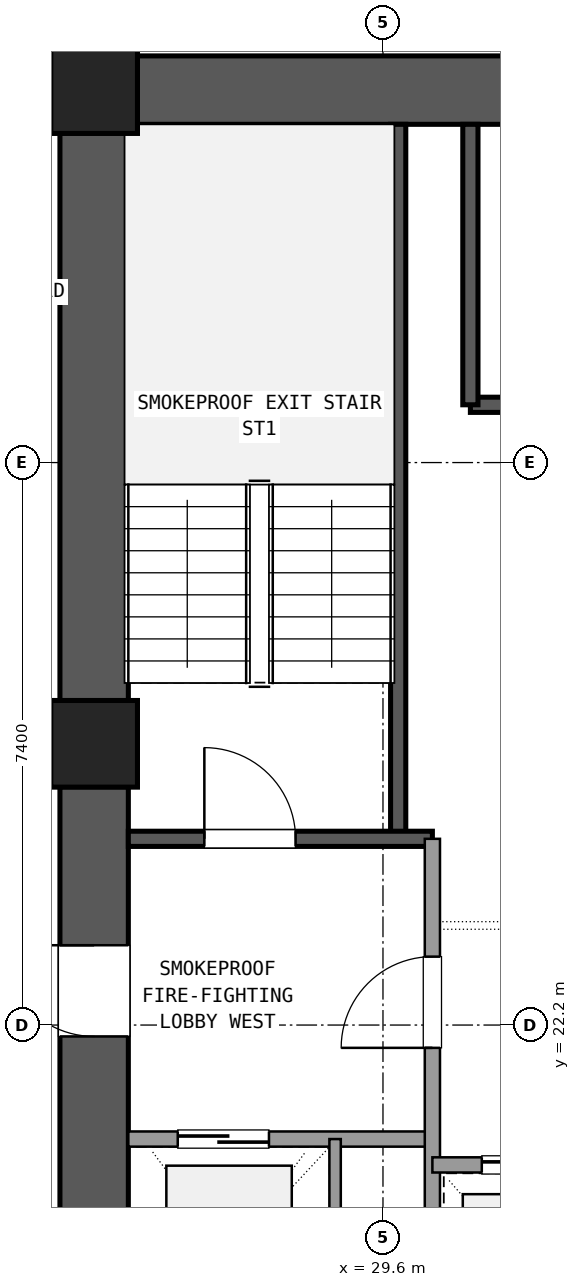
"""IFC4 building model, lengths in metres.
Left out: names, types, materials, properties, quantities, classifications, styles, units other than length and angle.
Written with IfcOpenShell. Run it as: python <this file> out.ifc"""

import sys

from ifc_helpers import new_model, si_unit, direction, frame, frame_2d, origin, origin_2d, place, context, subcontext, project, spatial, rectangle, extrude, element, fill, save


model = new_model("IFC4")
c1 = context("Model", 3, precision=1e-05, world=origin(), true_north=direction((0.0, 1.0)))
c2 = subcontext(c1, "Body", "Model", "MODEL_VIEW")
j1 = project(units=[si_unit("LENGTHUNIT", "METRE"), si_unit("PLANEANGLEUNIT", "RADIAN")], contexts=[c1])
p1 = place(None, origin())
s1 = spatial("IfcSite", under=j1, at=p1, CompositionType="ELEMENT")
p2 = place(p1, origin())
s2 = spatial("IfcBuilding", under=s1, at=p2, CompositionType="ELEMENT")
p3 = place(p2, frame((0.0, 0.0, 45.54)))
s3 = spatial("IfcBuildingStorey", under=s2, at=p3, CompositionType="ELEMENT", Elevation=45.54)
for number, where, z_axis, x_axis in (
    (1, (25.8, 34.5, 0.0), (0.0, 0.0, 1.0), (1.0, 0.0, 0.0)),
    (2, (25.8, 25.9, 0.0), (0.0, 0.0, 1.0), (1.0, 0.0, 0.0)),
):
    element("IfcColumn", number, at=place(p3, frame(where, z_axis=z_axis, x_axis=x_axis)), inside=s3, PredefinedType="COLUMN", context=c2, shape_type="SweptSolid", body=[
        extrude(rectangle(XDim=1.14, YDim=1.14, at=origin_2d()), origin(), (0.0, 0.0, 1.0), 3.6),
    ])
p4 = place(p3, frame((36.435, 34.5, 0.0), z_axis=(0.0, 0.0, 1.0), x_axis=(-1.0, 0.0, 0.0)))
e3 = element("IfcWall", 3, at=p4, inside=s3, PredefinedType="SHEAR", context=c2, shape_type="SweptSolid", body=[
    extrude(rectangle(XDim=10.07, YDim=0.9, at=frame_2d((5.035, 0.0))), origin(), (0.0, 0.0, 1.0), 3.32),
])
p5 = place(p4, frame((4.035, 0.0, 0.0)))
e4 = element("IfcOpeningElement", 4, at=p5, cuts=e3, PredefinedType="OPENING", context=c2, shape_type="SweptSolid", body=[
    extrude(rectangle(XDim=1.2, YDim=2.15, at=frame_2d((0.6, 1.075))), frame((0.0, 0.46, 0.0), z_axis=(0.0, -1.0, 0.0), x_axis=(1.0, 0.0, 0.0)), (0.0, 0.0, 1.0), 0.92),
])
p6 = place(p3, frame((25.8, 33.935, 0.0), z_axis=(0.0, 0.0, 1.0), x_axis=(0.0, -1.0, 0.0)))
e5 = element("IfcWall", 5, at=p6, inside=s3, PredefinedType="SHEAR", context=c2, shape_type="SweptSolid", body=[
    extrude(rectangle(XDim=7.47, YDim=0.9, at=frame_2d((3.735, 0.0))), origin(), (0.0, 0.0, 1.0), 3.32),
])
p7 = place(p3, frame((25.8, 25.335, 0.0), z_axis=(0.0, 0.0, 1.0), x_axis=(0.0, -1.0, 0.0)))
e6 = element("IfcWall", 6, at=p7, inside=s3, PredefinedType="SHEAR", context=c2, shape_type="SweptSolid", body=[
    extrude(rectangle(XDim=7.47, YDim=0.9, at=frame_2d((3.735, 0.0))), origin(), (0.0, 0.0, 1.0), 3.32),
])
p8 = place(p7, frame((2.085, 0.0, 0.0)))
e7 = element("IfcOpeningElement", 7, at=p8, cuts=e6, PredefinedType="OPENING", context=c2, shape_type="SweptSolid", body=[
    extrude(rectangle(XDim=1.2, YDim=2.15, at=frame_2d((0.6, 1.075))), frame((0.0, 0.46, 0.0), z_axis=(0.0, -1.0, 0.0), x_axis=(1.0, 0.0, 0.0)), (0.0, 0.0, 1.0), 0.92),
])
p9 = place(p3, frame((29.8, 24.65, 0.0), z_axis=(0.0, 0.0, 1.0), x_axis=(0.0, 1.0, 0.0)))
e8 = element("IfcWall", 8, at=p9, inside=s3, PredefinedType="SHEAR", context=c2, shape_type="SweptSolid", body=[
    extrude(rectangle(XDim=9.4, YDim=0.2, at=frame_2d((4.7, 0.0))), origin(), (0.0, 0.0, 1.0), 3.32),
])
p10 = place(p3, frame((26.25, 24.65, 0.0), z_axis=(0.0, 0.0, 1.0), x_axis=(1.0, 0.0, 0.0)))
e9 = element("IfcWall", 9, at=p10, inside=s3, PredefinedType="SHEAR", context=c2, shape_type="SweptSolid", body=[
    extrude(rectangle(XDim=4.0, YDim=0.2, at=frame_2d((2.0, 0.0))), origin(), (0.0, 0.0, 1.0), 3.32),
])
p11 = place(p10, frame((1.0, 0.0, 0.0)))
e10 = element("IfcOpeningElement", 10, at=p11, cuts=e9, PredefinedType="OPENING", context=c2, shape_type="SweptSolid", body=[
    extrude(rectangle(XDim=1.2, YDim=2.15, at=frame_2d((0.6, 1.075))), frame((0.0, 0.11, 0.0), z_axis=(0.0, -1.0, 0.0), x_axis=(1.0, 0.0, 0.0)), (0.0, 0.0, 1.0), 0.22),
])
p12 = place(p3, frame((30.75, 30.36, 0.0), z_axis=(0.0, 0.0, 1.0), x_axis=(1.0, 0.0, 0.0)))
e11 = element("IfcWall", 11, at=p12, inside=s3, PredefinedType="SHEAR", context=c2, shape_type="SweptSolid", body=[
    extrude(rectangle(XDim=9.5, YDim=0.2, at=frame_2d((4.75, 0.0))), origin(), (0.0, 0.0, 1.0), 3.32),
])
p13 = place(p3, frame((30.75, 30.36, 0.0), z_axis=(0.0, 0.0, 1.0), x_axis=(0.0, 1.0, 0.0)))
e12 = element("IfcWall", 12, at=p13, inside=s3, PredefinedType="SHEAR", context=c2, shape_type="SweptSolid", body=[
    extrude(rectangle(XDim=3.69, YDim=0.2, at=frame_2d((1.845, 0.0))), origin(), (0.0, 0.0, 1.0), 3.32),
])
p14 = place(p3, frame((26.25, 20.7, 0.0), z_axis=(0.0, 0.0, 1.0), x_axis=(1.0, 0.0, 0.0)))
e13 = element("IfcWall", 13, at=p14, inside=s3, PredefinedType="SOLIDWALL", context=c2, shape_type="SweptSolid", body=[
    extrude(rectangle(XDim=4.0, YDim=0.2, at=frame_2d((2.0, 0.0))), origin(), (0.0, 0.0, 1.0), 2.61),
])
p15 = place(p14, frame((0.65, 0.0, 0.0)))
e14 = element("IfcOpeningElement", 14, at=p15, cuts=e13, PredefinedType="OPENING", context=c2, shape_type="SweptSolid", body=[
    extrude(rectangle(XDim=1.2, YDim=2.15, at=frame_2d((0.6, 1.075))), frame((0.0, 0.11, 0.0), z_axis=(0.0, -1.0, 0.0), x_axis=(1.0, 0.0, 0.0)), (0.0, 0.0, 1.0), 0.22),
])
p16 = place(p3, frame((30.25, 17.75, 0.0), z_axis=(0.0, 0.0, 1.0), x_axis=(0.0, 1.0, 0.0)))
e15 = element("IfcWall", 15, at=p16, inside=s3, PredefinedType="SOLIDWALL", context=c2, shape_type="SweptSolid", body=[
    extrude(rectangle(XDim=6.9, YDim=0.2, at=frame_2d((3.45, 0.0))), origin(), (0.0, 0.0, 1.0), 2.61),
])
p17 = place(p16, frame((4.15, 0.0, 0.0)))
e16 = element("IfcOpeningElement", 16, at=p17, cuts=e15, PredefinedType="OPENING", context=c2, shape_type="SweptSolid", body=[
    extrude(rectangle(XDim=1.2, YDim=2.15, at=frame_2d((0.6, 1.075))), frame((0.0, 0.11, 0.0), z_axis=(0.0, -1.0, 0.0), x_axis=(1.0, 0.0, 0.0)), (0.0, 0.0, 1.0), 0.22),
])
p18 = place(p3, frame((28.97, 17.75, 0.0), z_axis=(0.0, 0.0, 1.0), x_axis=(0.0, 1.0, 0.0)))
e17 = element("IfcWall", 17, at=p18, inside=s3, PredefinedType="PARTITIONING", context=c2, shape_type="SweptSolid", body=[
    extrude(rectangle(XDim=2.95, YDim=0.15, at=frame_2d((1.475, 0.0))), origin(), (0.0, 0.0, 1.0), 2.61),
])
p19 = place(p3, frame((30.25, 20.36, 0.0), z_axis=(0.0, 0.0, 1.0), x_axis=(1.0, 0.0, 0.0)))
e18 = element("IfcWall", 18, at=p19, inside=s3, PredefinedType="SOLIDWALL", context=c2, shape_type="SweptSolid", body=[
    extrude(rectangle(XDim=7.0, YDim=0.2, at=frame_2d((3.5, 0.0))), origin(), (0.0, 0.0, 1.0), 2.61),
])
p20 = place(p19, frame((0.65, 0.0, 0.0)))
e19 = element("IfcOpeningElement", 19, at=p20, cuts=e18, PredefinedType="OPENING", context=c2, shape_type="SweptSolid", body=[
    extrude(rectangle(XDim=1.1, YDim=2.15, at=frame_2d((0.55, 1.075))), frame((0.0, 0.11, 0.0), z_axis=(0.0, -1.0, 0.0), x_axis=(1.0, 0.0, 0.0)), (0.0, 0.0, 1.0), 0.22),
])
p21 = place(p19, frame((2.95, 0.0, 0.0)))
e20 = element("IfcOpeningElement", 20, at=p21, cuts=e18, PredefinedType="OPENING", context=c2, shape_type="SweptSolid", body=[
    extrude(rectangle(XDim=1.1, YDim=2.15, at=frame_2d((0.55, 1.075))), frame((0.0, 0.11, 0.0), z_axis=(0.0, -1.0, 0.0), x_axis=(1.0, 0.0, 0.0)), (0.0, 0.0, 1.0), 0.22),
])
p22 = place(p19, frame((5.25, 0.0, 0.0)))
e21 = element("IfcOpeningElement", 21, at=p22, cuts=e18, PredefinedType="OPENING", context=c2, shape_type="SweptSolid", body=[
    extrude(rectangle(XDim=1.1, YDim=2.15, at=frame_2d((0.55, 1.075))), frame((0.0, 0.11, 0.0), z_axis=(0.0, -1.0, 0.0), x_axis=(1.0, 0.0, 0.0)), (0.0, 0.0, 1.0), 0.22),
])
p23 = place(p11, origin())
e22 = element("IfcDoor", 22, at=p23, inside=s3, OperationType="SINGLE_SWING_LEFT", PredefinedType="DOOR", context=c2, shape_type="SweptSolid", body=[
    extrude(rectangle(XDim=1.2, YDim=2.15, at=frame_2d((0.6, 1.075))), frame((0.0, 0.025, 0.0), z_axis=(0.0, -1.0, 0.0), x_axis=(1.0, 0.0, 0.0)), (0.0, 0.0, 1.0), 0.05),
])
fill(e10, e22)
p24 = place(p15, origin())
e23 = element("IfcDoor", 23, at=p24, inside=s3, OperationType="SLIDING_TO_LEFT", PredefinedType="DOOR", context=c2, shape_type="SweptSolid", body=[
    extrude(rectangle(XDim=1.2, YDim=2.15, at=frame_2d((0.6, 1.075))), frame((0.0, 0.025, 0.0), z_axis=(0.0, -1.0, 0.0), x_axis=(1.0, 0.0, 0.0)), (0.0, 0.0, 1.0), 0.05),
])
fill(e14, e23)
p25 = place(p17, origin())
e24 = element("IfcDoor", 24, at=p25, inside=s3, OperationType="SINGLE_SWING_LEFT", PredefinedType="DOOR", context=c2, shape_type="SweptSolid", body=[
    extrude(rectangle(XDim=1.2, YDim=2.15, at=frame_2d((0.6, 1.075))), frame((0.0, 0.025, 0.0), z_axis=(0.0, -1.0, 0.0), x_axis=(1.0, 0.0, 0.0)), (0.0, 0.0, 1.0), 0.05),
])
fill(e16, e24)
p26 = place(p8, frame((1.2, 0.0, 0.0), z_axis=(0.0, 0.0, 1.0), x_axis=(-1.0, 0.0, 0.0)))
e25 = element("IfcDoor", 25, at=p26, inside=s3, OperationType="SINGLE_SWING_LEFT", PredefinedType="DOOR", context=c2, shape_type="SweptSolid", body=[
    extrude(rectangle(XDim=1.2, YDim=2.15, at=frame_2d((0.6, 1.075))), frame((0.0, 0.025, 0.0), z_axis=(0.0, -1.0, 0.0), x_axis=(1.0, 0.0, 0.0)), (0.0, 0.0, 1.0), 0.05),
])
fill(e7, e25)
p27 = place(p20, origin())
e26 = element("IfcDoor", 26, at=p27, inside=s3, OperationType="SLIDING_TO_LEFT", PredefinedType="DOOR", context=c2, shape_type="SweptSolid", body=[
    extrude(rectangle(XDim=1.1, YDim=2.15, at=frame_2d((0.55, 1.075))), frame((0.0, 0.025, 0.0), z_axis=(0.0, -1.0, 0.0), x_axis=(1.0, 0.0, 0.0)), (0.0, 0.0, 1.0), 0.05),
])
fill(e19, e26)
save(model, sys.argv[1])
